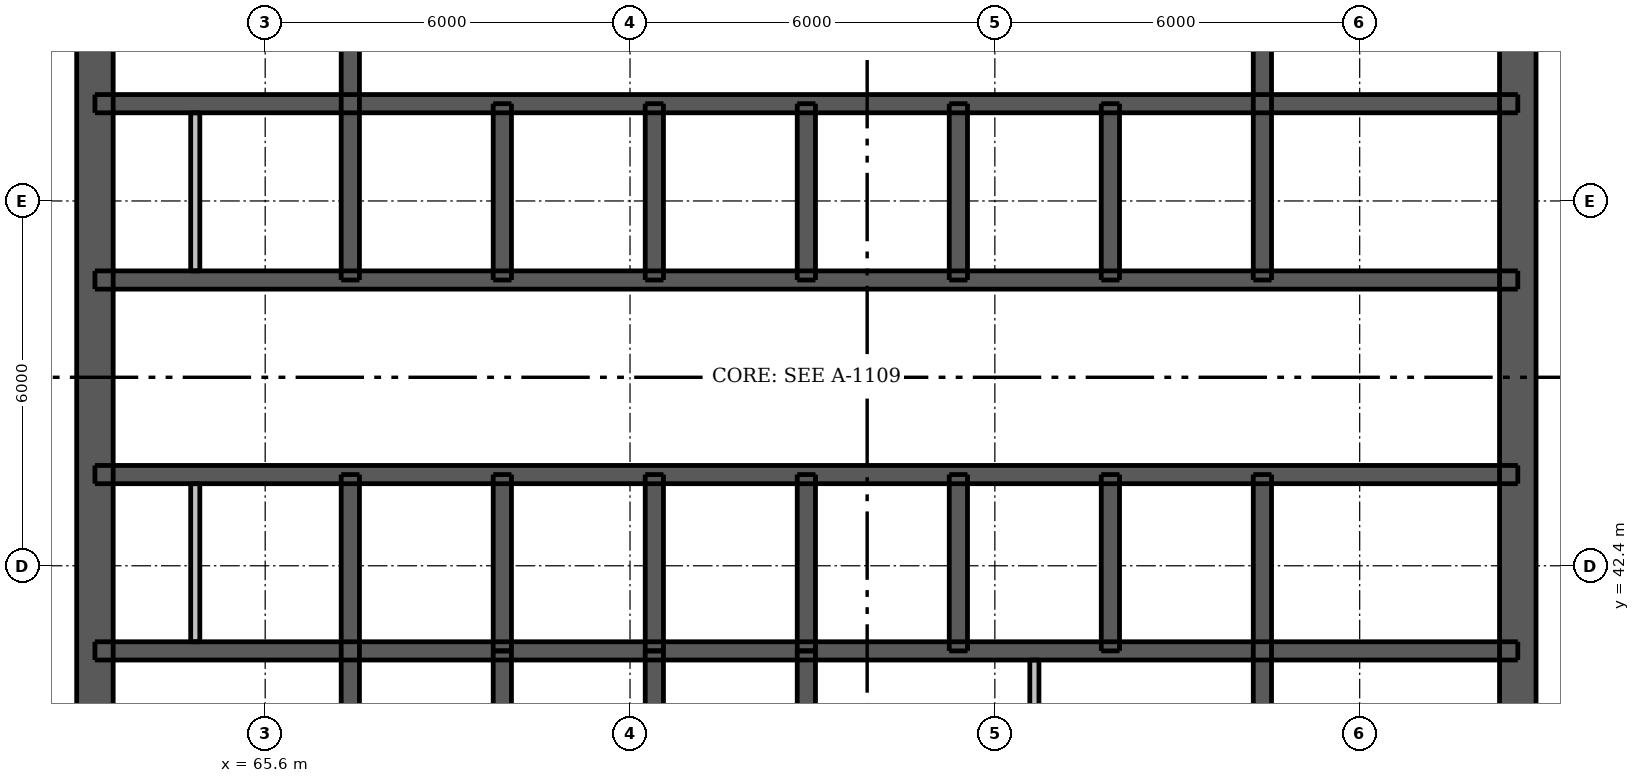
"""IFC4 building model, lengths in metres.
Left out: names, types, materials, properties, quantities, classifications, styles, units other than length and angle.
Written with IfcOpenShell. Run it as: python <this file> out.ifc"""

import sys

from ifc_helpers import new_model, si_unit, direction, frame, frame_2d, origin, place, context, subcontext, project, spatial, rectangle, extrude, element, fill, save


model = new_model("IFC4")
c1 = context("Model", 3, precision=1e-05, world=origin(), true_north=direction((0.0, 1.0)))
c2 = subcontext(c1, "Body", "Model", "MODEL_VIEW")
j1 = project(units=[si_unit("LENGTHUNIT", "METRE"), si_unit("PLANEANGLEUNIT", "RADIAN")], contexts=[c1])
p1 = place(None, origin())
s1 = spatial("IfcSite", under=j1, at=p1, CompositionType="ELEMENT")
p2 = place(p1, origin())
s2 = spatial("IfcBuilding", under=s1, at=p2, CompositionType="ELEMENT")
p3 = place(p2, frame((0.0, 0.0, 187.0)))
s3 = spatial("IfcBuildingStorey", under=s2, at=p3, CompositionType="ELEMENT", Elevation=187.0)
p4 = place(p3, frame((62.8, 33.5, 0.0), z_axis=(0.0, 0.0, 1.0), x_axis=(0.0, 1.0, 0.0)))
e1 = element("IfcWall", 1, at=p4, inside=s3, PredefinedType="SHEAR", context=c2, shape_type="SweptSolid", body=[
    extrude(rectangle(XDim=24.0, YDim=0.6, at=frame_2d((12.0, 0.0))), origin(), (0.0, 0.0, 1.0), 3.05),
])
p5 = place(p4, frame((11.2, 0.0, 0.0)))
e2 = element("IfcOpeningElement", 2, at=p5, cuts=e1, PredefinedType="OPENING", context=c2, shape_type="SweptSolid", body=[
    extrude(rectangle(XDim=1.6, YDim=2.1, at=frame_2d((0.8, 1.05))), frame((0.0, 0.31, 0.0), z_axis=(0.0, -1.0, 0.0), x_axis=(1.0, 0.0, 0.0)), (0.0, 0.0, 1.0), 0.62),
])
p6 = place(p3, frame((86.2, 33.5, 0.0), z_axis=(0.0, 0.0, 1.0), x_axis=(0.0, 1.0, 0.0)))
e3 = element("IfcWall", 3, at=p6, inside=s3, PredefinedType="SHEAR", context=c2, shape_type="SweptSolid", body=[
    extrude(rectangle(XDim=24.0, YDim=0.6, at=frame_2d((12.0, 0.0))), origin(), (0.0, 0.0, 1.0), 3.05),
])
p7 = place(p6, frame((11.2, 0.0, 0.0)))
e4 = element("IfcOpeningElement", 4, at=p7, cuts=e3, PredefinedType="OPENING", context=c2, shape_type="SweptSolid", body=[
    extrude(rectangle(XDim=1.6, YDim=2.1, at=frame_2d((0.8, 1.05))), frame((0.0, 0.31, 0.0), z_axis=(0.0, -1.0, 0.0), x_axis=(1.0, 0.0, 0.0)), (0.0, 0.0, 1.0), 0.62),
])
p8 = place(p3, frame((62.8, 41.0, 0.0), z_axis=(0.0, 0.0, 1.0), x_axis=(1.0, 0.0, 0.0)))
e5 = element("IfcWall", 5, at=p8, inside=s3, PredefinedType="SHEAR", context=c2, shape_type="SweptSolid", body=[
    extrude(rectangle(XDim=23.4, YDim=0.3, at=frame_2d((11.7, 0.0))), origin(), (0.0, 0.0, 1.0), 3.05),
])
p9 = place(p3, frame((62.8, 43.9, 0.0), z_axis=(0.0, 0.0, 1.0), x_axis=(1.0, 0.0, 0.0)))
e6 = element("IfcWall", 6, at=p9, inside=s3, PredefinedType="SHEAR", context=c2, shape_type="SweptSolid", body=[
    extrude(rectangle(XDim=23.4, YDim=0.3, at=frame_2d((11.7, 0.0))), origin(), (0.0, 0.0, 1.0), 3.05),
])
p10 = place(p9, frame((0.575, 0.0, 0.0)))
e7 = element("IfcOpeningElement", 7, at=p10, cuts=e6, PredefinedType="OPENING", context=c2, shape_type="SweptSolid", body=[
    extrude(rectangle(XDim=0.8, YDim=2.1, at=frame_2d((0.4, 1.05))), frame((0.0, 0.16, 0.0), z_axis=(0.0, -1.0, 0.0), x_axis=(1.0, 0.0, 0.0)), (0.0, 0.0, 1.0), 0.32),
])
p11 = place(p9, frame((2.4, 0.0, 0.0)))
e8 = element("IfcOpeningElement", 8, at=p11, cuts=e6, PredefinedType="OPENING", context=c2, shape_type="SweptSolid", body=[
    extrude(rectangle(XDim=0.9, YDim=2.1, at=frame_2d((0.45, 1.05))), frame((0.0, 0.16, 0.0), z_axis=(0.0, -1.0, 0.0), x_axis=(1.0, 0.0, 0.0)), (0.0, 0.0, 1.0), 0.32),
])
p12 = place(p9, frame((20.775, 0.0, 0.0)))
e9 = element("IfcOpeningElement", 9, at=p12, cuts=e6, PredefinedType="OPENING", context=c2, shape_type="SweptSolid", body=[
    extrude(rectangle(XDim=0.9, YDim=2.1, at=frame_2d((0.45, 1.05))), frame((0.0, 0.16, 0.0), z_axis=(0.0, -1.0, 0.0), x_axis=(1.0, 0.0, 0.0)), (0.0, 0.0, 1.0), 0.32),
])
p13 = place(p9, frame((7.5, 0.0, 0.0)))
e10 = element("IfcOpeningElement", 10, at=p13, cuts=e6, PredefinedType="OPENING", context=c2, shape_type="SweptSolid", body=[
    extrude(rectangle(XDim=0.9, YDim=2.1, at=frame_2d((0.45, 1.05))), frame((0.0, 0.16, 0.0), z_axis=(0.0, -1.0, 0.0), x_axis=(1.0, 0.0, 0.0)), (0.0, 0.0, 1.0), 0.32),
])
p14 = place(p9, frame((10.0, 0.0, 0.0)))
e11 = element("IfcOpeningElement", 11, at=p14, cuts=e6, PredefinedType="OPENING", context=c2, shape_type="SweptSolid", body=[
    extrude(rectangle(XDim=0.9, YDim=2.1, at=frame_2d((0.45, 1.05))), frame((0.0, 0.16, 0.0), z_axis=(0.0, -1.0, 0.0), x_axis=(1.0, 0.0, 0.0)), (0.0, 0.0, 1.0), 0.32),
])
p15 = place(p9, frame((15.0, 0.0, 0.0)))
e12 = element("IfcOpeningElement", 12, at=p15, cuts=e6, PredefinedType="OPENING", context=c2, shape_type="SweptSolid", body=[
    extrude(rectangle(XDim=0.9, YDim=2.1, at=frame_2d((0.45, 1.05))), frame((0.0, 0.16, 0.0), z_axis=(0.0, -1.0, 0.0), x_axis=(1.0, 0.0, 0.0)), (0.0, 0.0, 1.0), 0.32),
])
p16 = place(p9, frame((17.5, 0.0, 0.0)))
e13 = element("IfcOpeningElement", 13, at=p16, cuts=e6, PredefinedType="OPENING", context=c2, shape_type="SweptSolid", body=[
    extrude(rectangle(XDim=0.9, YDim=2.1, at=frame_2d((0.45, 1.05))), frame((0.0, 0.16, 0.0), z_axis=(0.0, -1.0, 0.0), x_axis=(1.0, 0.0, 0.0)), (0.0, 0.0, 1.0), 0.32),
])
p17 = place(p3, frame((62.8, 47.1, 0.0), z_axis=(0.0, 0.0, 1.0), x_axis=(1.0, 0.0, 0.0)))
e14 = element("IfcWall", 14, at=p17, inside=s3, PredefinedType="SHEAR", context=c2, shape_type="SweptSolid", body=[
    extrude(rectangle(XDim=23.4, YDim=0.3, at=frame_2d((11.7, 0.0))), origin(), (0.0, 0.0, 1.0), 3.05),
])
p18 = place(p17, frame((0.575, 0.0, 0.0)))
e15 = element("IfcOpeningElement", 15, at=p18, cuts=e14, PredefinedType="OPENING", context=c2, shape_type="SweptSolid", body=[
    extrude(rectangle(XDim=0.8, YDim=2.1, at=frame_2d((0.4, 1.05))), frame((0.0, 0.16, 0.0), z_axis=(0.0, -1.0, 0.0), x_axis=(1.0, 0.0, 0.0)), (0.0, 0.0, 1.0), 0.32),
])
p19 = place(p17, frame((2.4, 0.0, 0.0)))
e16 = element("IfcOpeningElement", 16, at=p19, cuts=e14, PredefinedType="OPENING", context=c2, shape_type="SweptSolid", body=[
    extrude(rectangle(XDim=0.9, YDim=2.1, at=frame_2d((0.45, 1.05))), frame((0.0, 0.16, 0.0), z_axis=(0.0, -1.0, 0.0), x_axis=(1.0, 0.0, 0.0)), (0.0, 0.0, 1.0), 0.32),
])
p20 = place(p17, frame((20.775, 0.0, 0.0)))
e17 = element("IfcOpeningElement", 17, at=p20, cuts=e14, PredefinedType="OPENING", context=c2, shape_type="SweptSolid", body=[
    extrude(rectangle(XDim=0.9, YDim=2.1, at=frame_2d((0.45, 1.05))), frame((0.0, 0.16, 0.0), z_axis=(0.0, -1.0, 0.0), x_axis=(1.0, 0.0, 0.0)), (0.0, 0.0, 1.0), 0.32),
])
p21 = place(p17, frame((4.9, 0.0, 0.0)))
e18 = element("IfcOpeningElement", 18, at=p21, cuts=e14, PredefinedType="OPENING", context=c2, shape_type="SweptSolid", body=[
    extrude(rectangle(XDim=1.1, YDim=2.1, at=frame_2d((0.55, 1.05))), frame((0.0, 0.16, 0.0), z_axis=(0.0, -1.0, 0.0), x_axis=(1.0, 0.0, 0.0)), (0.0, 0.0, 1.0), 0.32),
])
p22 = place(p17, frame((7.4, 0.0, 0.0)))
e19 = element("IfcOpeningElement", 19, at=p22, cuts=e14, PredefinedType="OPENING", context=c2, shape_type="SweptSolid", body=[
    extrude(rectangle(XDim=1.1, YDim=2.1, at=frame_2d((0.55, 1.05))), frame((0.0, 0.16, 0.0), z_axis=(0.0, -1.0, 0.0), x_axis=(1.0, 0.0, 0.0)), (0.0, 0.0, 1.0), 0.32),
])
p23 = place(p17, frame((9.9, 0.0, 0.0)))
e20 = element("IfcOpeningElement", 20, at=p23, cuts=e14, PredefinedType="OPENING", context=c2, shape_type="SweptSolid", body=[
    extrude(rectangle(XDim=1.1, YDim=2.1, at=frame_2d((0.55, 1.05))), frame((0.0, 0.16, 0.0), z_axis=(0.0, -1.0, 0.0), x_axis=(1.0, 0.0, 0.0)), (0.0, 0.0, 1.0), 0.32),
])
p24 = place(p17, frame((12.4, 0.0, 0.0)))
e21 = element("IfcOpeningElement", 21, at=p24, cuts=e14, PredefinedType="OPENING", context=c2, shape_type="SweptSolid", body=[
    extrude(rectangle(XDim=1.1, YDim=2.1, at=frame_2d((0.55, 1.05))), frame((0.0, 0.16, 0.0), z_axis=(0.0, -1.0, 0.0), x_axis=(1.0, 0.0, 0.0)), (0.0, 0.0, 1.0), 0.32),
])
p25 = place(p17, frame((14.9, 0.0, 0.0)))
e22 = element("IfcOpeningElement", 22, at=p25, cuts=e14, PredefinedType="OPENING", context=c2, shape_type="SweptSolid", body=[
    extrude(rectangle(XDim=1.1, YDim=2.1, at=frame_2d((0.55, 1.05))), frame((0.0, 0.16, 0.0), z_axis=(0.0, -1.0, 0.0), x_axis=(1.0, 0.0, 0.0)), (0.0, 0.0, 1.0), 0.32),
])
p26 = place(p17, frame((17.4, 0.0, 0.0)))
e23 = element("IfcOpeningElement", 23, at=p26, cuts=e14, PredefinedType="OPENING", context=c2, shape_type="SweptSolid", body=[
    extrude(rectangle(XDim=1.1, YDim=2.1, at=frame_2d((0.55, 1.05))), frame((0.0, 0.16, 0.0), z_axis=(0.0, -1.0, 0.0), x_axis=(1.0, 0.0, 0.0)), (0.0, 0.0, 1.0), 0.32),
])
p27 = place(p3, frame((62.8, 50.0, 0.0), z_axis=(0.0, 0.0, 1.0), x_axis=(1.0, 0.0, 0.0)))
e24 = element("IfcWall", 24, at=p27, inside=s3, PredefinedType="SHEAR", context=c2, shape_type="SweptSolid", body=[
    extrude(rectangle(XDim=23.4, YDim=0.3, at=frame_2d((11.7, 0.0))), origin(), (0.0, 0.0, 1.0), 3.05),
])
p28 = place(p3, frame((67.0, 33.8, 0.0), z_axis=(0.0, 0.0, 1.0), x_axis=(0.0, 1.0, 0.0)))
e25 = element("IfcWall", 25, at=p28, inside=s3, PredefinedType="SHEAR", context=c2, shape_type="SweptSolid", body=[
    extrude(rectangle(XDim=10.1, YDim=0.3, at=frame_2d((5.05, 0.0))), origin(), (0.0, 0.0, 1.0), 3.05),
])
p29 = place(p28, frame((0.5, 0.0, 0.0)))
e26 = element("IfcOpeningElement", 26, at=p29, cuts=e25, PredefinedType="OPENING", context=c2, shape_type="SweptSolid", body=[
    extrude(rectangle(XDim=1.1, YDim=2.1, at=frame_2d((0.55, 1.05))), frame((0.0, 0.16, 0.0), z_axis=(0.0, -1.0, 0.0), x_axis=(1.0, 0.0, 0.0)), (0.0, 0.0, 1.0), 0.32),
])
for number, where, z_axis, x_axis in (
    (27, (67.0, 47.1, 0.0), (0.0, 0.0, 1.0), (0.0, 1.0, 0.0)),
    (28, (82.0, 33.8, 0.0), (0.0, 0.0, 1.0), (0.0, 1.0, 0.0)),
    (29, (82.0, 47.1, 0.0), (0.0, 0.0, 1.0), (0.0, 1.0, 0.0)),
):
    element("IfcWall", number, at=place(p3, frame(where, z_axis=z_axis, x_axis=x_axis)), inside=s3, PredefinedType="SHEAR", context=c2, shape_type="SweptSolid", body=[
        extrude(rectangle(XDim=10.1, YDim=0.3, at=frame_2d((5.05, 0.0))), origin(), (0.0, 0.0, 1.0), 3.05),
    ])
for number, where, z_axis, x_axis in (
    (30, (69.5, 41.0, 0.0), (0.0, 0.0, 1.0), (0.0, 1.0, 0.0)),
    (31, (69.5, 47.1, 0.0), (0.0, 0.0, 1.0), (0.0, 1.0, 0.0)),
    (32, (72.0, 41.0, 0.0), (0.0, 0.0, 1.0), (0.0, 1.0, 0.0)),
    (33, (72.0, 47.1, 0.0), (0.0, 0.0, 1.0), (0.0, 1.0, 0.0)),
    (34, (74.5, 41.0, 0.0), (0.0, 0.0, 1.0), (0.0, 1.0, 0.0)),
    (35, (74.5, 47.1, 0.0), (0.0, 0.0, 1.0), (0.0, 1.0, 0.0)),
    (36, (77.0, 41.0, 0.0), (0.0, 0.0, 1.0), (0.0, 1.0, 0.0)),
    (37, (77.0, 47.1, 0.0), (0.0, 0.0, 1.0), (0.0, 1.0, 0.0)),
    (38, (79.5, 41.0, 0.0), (0.0, 0.0, 1.0), (0.0, 1.0, 0.0)),
    (39, (79.5, 47.1, 0.0), (0.0, 0.0, 1.0), (0.0, 1.0, 0.0)),
    (40, (69.5, 38.1, 0.0), (0.0, 0.0, 1.0), (0.0, 1.0, 0.0)),
    (41, (72.0, 38.1, 0.0), (0.0, 0.0, 1.0), (0.0, 1.0, 0.0)),
    (42, (74.5, 38.1, 0.0), (0.0, 0.0, 1.0), (0.0, 1.0, 0.0)),
):
    element("IfcWall", number, at=place(p3, frame(where, z_axis=z_axis, x_axis=x_axis)), inside=s3, PredefinedType="SHEAR", context=c2, shape_type="SweptSolid", body=[
        extrude(rectangle(XDim=2.9, YDim=0.3, at=frame_2d((1.45, 0.0))), origin(), (0.0, 0.0, 1.0), 3.05),
    ])
p30 = place(p3, frame((78.25, 34.1, 0.0), z_axis=(0.0, 0.0, 1.0), x_axis=(0.0, 1.0, 0.0)))
e43 = element("IfcWall", 43, at=p30, inside=s3, PredefinedType="PLUMBINGWALL", context=c2, shape_type="SweptSolid", body=[
    extrude(rectangle(XDim=6.75, YDim=0.15, at=frame_2d((3.375, 0.0))), origin(), (0.0, 0.0, 1.0), 3.05),
])
for number, where, z_axis, x_axis in (
    (44, (64.45, 41.15, 0.0), (0.0, 0.0, 1.0), (0.0, 1.0, 0.0)),
    (45, (64.45, 47.25, 0.0), (0.0, 0.0, 1.0), (0.0, 1.0, 0.0)),
):
    element("IfcWall", number, at=place(p3, frame(where, z_axis=z_axis, x_axis=x_axis)), inside=s3, PredefinedType="PLUMBINGWALL", context=c2, shape_type="SweptSolid", body=[
        extrude(rectangle(XDim=2.6, YDim=0.15, at=frame_2d((1.3, 0.0))), origin(), (0.0, 0.0, 1.0), 3.05),
    ])
p31 = place(p5, origin())
e46 = element("IfcDoor", 46, at=p31, inside=s3, OperationType="DOUBLE_DOOR_SINGLE_SWING", PredefinedType="DOOR", context=c2, shape_type="SweptSolid", body=[
    extrude(rectangle(XDim=1.6, YDim=2.1, at=frame_2d((0.8, 1.05))), frame((0.0, -0.237, 0.0), z_axis=(0.0, -1.0, 0.0), x_axis=(1.0, 0.0, 0.0)), (0.0, 0.0, 1.0), 0.05),
])
fill(e2, e46)
p32 = place(p7, origin())
e47 = element("IfcDoor", 47, at=p32, inside=s3, OperationType="DOUBLE_DOOR_SINGLE_SWING", PredefinedType="DOOR", context=c2, shape_type="SweptSolid", body=[
    extrude(rectangle(XDim=1.6, YDim=2.1, at=frame_2d((0.8, 1.05))), frame((0.0, 0.288, 0.0), z_axis=(0.0, -1.0, 0.0), x_axis=(1.0, 0.0, 0.0)), (0.0, 0.0, 1.0), 0.05),
])
fill(e4, e47)
p33 = place(p10, origin())
e48 = element("IfcDoor", 48, at=p33, inside=s3, OperationType="SINGLE_SWING_LEFT", PredefinedType="DOOR", context=c2, shape_type="SweptSolid", body=[
    extrude(rectangle(XDim=0.8, YDim=2.1, at=frame_2d((0.4, 1.05))), frame((0.0, -0.087, 0.0), z_axis=(0.0, -1.0, 0.0), x_axis=(1.0, 0.0, 0.0)), (0.0, 0.0, 1.0), 0.05),
])
fill(e7, e48)
p34 = place(p11, origin())
e49 = element("IfcDoor", 49, at=p34, inside=s3, OperationType="SINGLE_SWING_RIGHT", PredefinedType="DOOR", context=c2, shape_type="SweptSolid", body=[
    extrude(rectangle(XDim=0.9, YDim=2.1, at=frame_2d((0.45, 1.05))), frame((0.0, -0.087, 0.0), z_axis=(0.0, -1.0, 0.0), x_axis=(1.0, 0.0, 0.0)), (0.0, 0.0, 1.0), 0.05),
])
fill(e8, e49)
p35 = place(p12, origin())
e50 = element("IfcDoor", 50, at=p35, inside=s3, OperationType="SINGLE_SWING_LEFT", PredefinedType="DOOR", context=c2, shape_type="SweptSolid", body=[
    extrude(rectangle(XDim=0.9, YDim=2.1, at=frame_2d((0.45, 1.05))), frame((0.0, -0.087, 0.0), z_axis=(0.0, -1.0, 0.0), x_axis=(1.0, 0.0, 0.0)), (0.0, 0.0, 1.0), 0.05),
])
fill(e9, e50)
p36 = place(p18, origin())
e51 = element("IfcDoor", 51, at=p36, inside=s3, OperationType="SINGLE_SWING_LEFT", PredefinedType="DOOR", context=c2, shape_type="SweptSolid", body=[
    extrude(rectangle(XDim=0.8, YDim=2.1, at=frame_2d((0.4, 1.05))), frame((0.0, 0.138, 0.0), z_axis=(0.0, -1.0, 0.0), x_axis=(1.0, 0.0, 0.0)), (0.0, 0.0, 1.0), 0.05),
])
fill(e15, e51)
p37 = place(p19, origin())
e52 = element("IfcDoor", 52, at=p37, inside=s3, OperationType="SINGLE_SWING_RIGHT", PredefinedType="DOOR", context=c2, shape_type="SweptSolid", body=[
    extrude(rectangle(XDim=0.9, YDim=2.1, at=frame_2d((0.45, 1.05))), frame((0.0, 0.138, 0.0), z_axis=(0.0, -1.0, 0.0), x_axis=(1.0, 0.0, 0.0)), (0.0, 0.0, 1.0), 0.05),
])
fill(e16, e52)
p38 = place(p20, origin())
e53 = element("IfcDoor", 53, at=p38, inside=s3, OperationType="SINGLE_SWING_LEFT", PredefinedType="DOOR", context=c2, shape_type="SweptSolid", body=[
    extrude(rectangle(XDim=0.9, YDim=2.1, at=frame_2d((0.45, 1.05))), frame((0.0, 0.138, 0.0), z_axis=(0.0, -1.0, 0.0), x_axis=(1.0, 0.0, 0.0)), (0.0, 0.0, 1.0), 0.05),
])
fill(e17, e53)
p39 = place(p13, origin())
e54 = element("IfcDoor", 54, at=p39, inside=s3, OperationType="SINGLE_SWING_LEFT", PredefinedType="DOOR", context=c2, shape_type="SweptSolid", body=[
    extrude(rectangle(XDim=0.9, YDim=2.1, at=frame_2d((0.45, 1.05))), frame((0.0, -0.087, 0.0), z_axis=(0.0, -1.0, 0.0), x_axis=(1.0, 0.0, 0.0)), (0.0, 0.0, 1.0), 0.05),
])
fill(e10, e54)
p40 = place(p14, origin())
e55 = element("IfcDoor", 55, at=p40, inside=s3, OperationType="SINGLE_SWING_RIGHT", PredefinedType="DOOR", context=c2, shape_type="SweptSolid", body=[
    extrude(rectangle(XDim=0.9, YDim=2.1, at=frame_2d((0.45, 1.05))), frame((0.0, -0.087, 0.0), z_axis=(0.0, -1.0, 0.0), x_axis=(1.0, 0.0, 0.0)), (0.0, 0.0, 1.0), 0.05),
])
fill(e11, e55)
p41 = place(p15, origin())
e56 = element("IfcDoor", 56, at=p41, inside=s3, OperationType="SINGLE_SWING_RIGHT", PredefinedType="DOOR", context=c2, shape_type="SweptSolid", body=[
    extrude(rectangle(XDim=0.9, YDim=2.1, at=frame_2d((0.45, 1.05))), frame((0.0, -0.087, 0.0), z_axis=(0.0, -1.0, 0.0), x_axis=(1.0, 0.0, 0.0)), (0.0, 0.0, 1.0), 0.05),
])
fill(e12, e56)
p42 = place(p16, origin())
e57 = element("IfcDoor", 57, at=p42, inside=s3, OperationType="SINGLE_SWING_LEFT", PredefinedType="DOOR", context=c2, shape_type="SweptSolid", body=[
    extrude(rectangle(XDim=0.9, YDim=2.1, at=frame_2d((0.45, 1.05))), frame((0.0, -0.087, 0.0), z_axis=(0.0, -1.0, 0.0), x_axis=(1.0, 0.0, 0.0)), (0.0, 0.0, 1.0), 0.05),
])
fill(e13, e57)
p43 = place(p21, origin())
e58 = element("IfcDoor", 58, at=p43, inside=s3, OperationType="DOUBLE_DOOR_SLIDING", PredefinedType="DOOR", context=c2, shape_type="SweptSolid", body=[
    extrude(rectangle(XDim=1.1, YDim=2.1, at=frame_2d((0.55, 1.05))), frame((0.0, 0.025, 0.0), z_axis=(0.0, -1.0, 0.0), x_axis=(1.0, 0.0, 0.0)), (0.0, 0.0, 1.0), 0.05),
])
fill(e18, e58)
p44 = place(p22, origin())
e59 = element("IfcDoor", 59, at=p44, inside=s3, OperationType="DOUBLE_DOOR_SLIDING", PredefinedType="DOOR", context=c2, shape_type="SweptSolid", body=[
    extrude(rectangle(XDim=1.1, YDim=2.1, at=frame_2d((0.55, 1.05))), frame((0.0, 0.025, 0.0), z_axis=(0.0, -1.0, 0.0), x_axis=(1.0, 0.0, 0.0)), (0.0, 0.0, 1.0), 0.05),
])
fill(e19, e59)
p45 = place(p23, origin())
e60 = element("IfcDoor", 60, at=p45, inside=s3, OperationType="DOUBLE_DOOR_SLIDING", PredefinedType="DOOR", context=c2, shape_type="SweptSolid", body=[
    extrude(rectangle(XDim=1.1, YDim=2.1, at=frame_2d((0.55, 1.05))), frame((0.0, 0.025, 0.0), z_axis=(0.0, -1.0, 0.0), x_axis=(1.0, 0.0, 0.0)), (0.0, 0.0, 1.0), 0.05),
])
fill(e20, e60)
p46 = place(p24, origin())
e61 = element("IfcDoor", 61, at=p46, inside=s3, OperationType="DOUBLE_DOOR_SLIDING", PredefinedType="DOOR", context=c2, shape_type="SweptSolid", body=[
    extrude(rectangle(XDim=1.1, YDim=2.1, at=frame_2d((0.55, 1.05))), frame((0.0, 0.025, 0.0), z_axis=(0.0, -1.0, 0.0), x_axis=(1.0, 0.0, 0.0)), (0.0, 0.0, 1.0), 0.05),
])
fill(e21, e61)
p47 = place(p25, origin())
e62 = element("IfcDoor", 62, at=p47, inside=s3, OperationType="DOUBLE_DOOR_SLIDING", PredefinedType="DOOR", context=c2, shape_type="SweptSolid", body=[
    extrude(rectangle(XDim=1.1, YDim=2.1, at=frame_2d((0.55, 1.05))), frame((0.0, 0.025, 0.0), z_axis=(0.0, -1.0, 0.0), x_axis=(1.0, 0.0, 0.0)), (0.0, 0.0, 1.0), 0.05),
])
fill(e22, e62)
p48 = place(p26, origin())
e63 = element("IfcDoor", 63, at=p48, inside=s3, OperationType="DOUBLE_DOOR_SLIDING", PredefinedType="DOOR", context=c2, shape_type="SweptSolid", body=[
    extrude(rectangle(XDim=1.1, YDim=2.1, at=frame_2d((0.55, 1.05))), frame((0.0, 0.025, 0.0), z_axis=(0.0, -1.0, 0.0), x_axis=(1.0, 0.0, 0.0)), (0.0, 0.0, 1.0), 0.05),
])
fill(e23, e63)
save(model, sys.argv[1])
